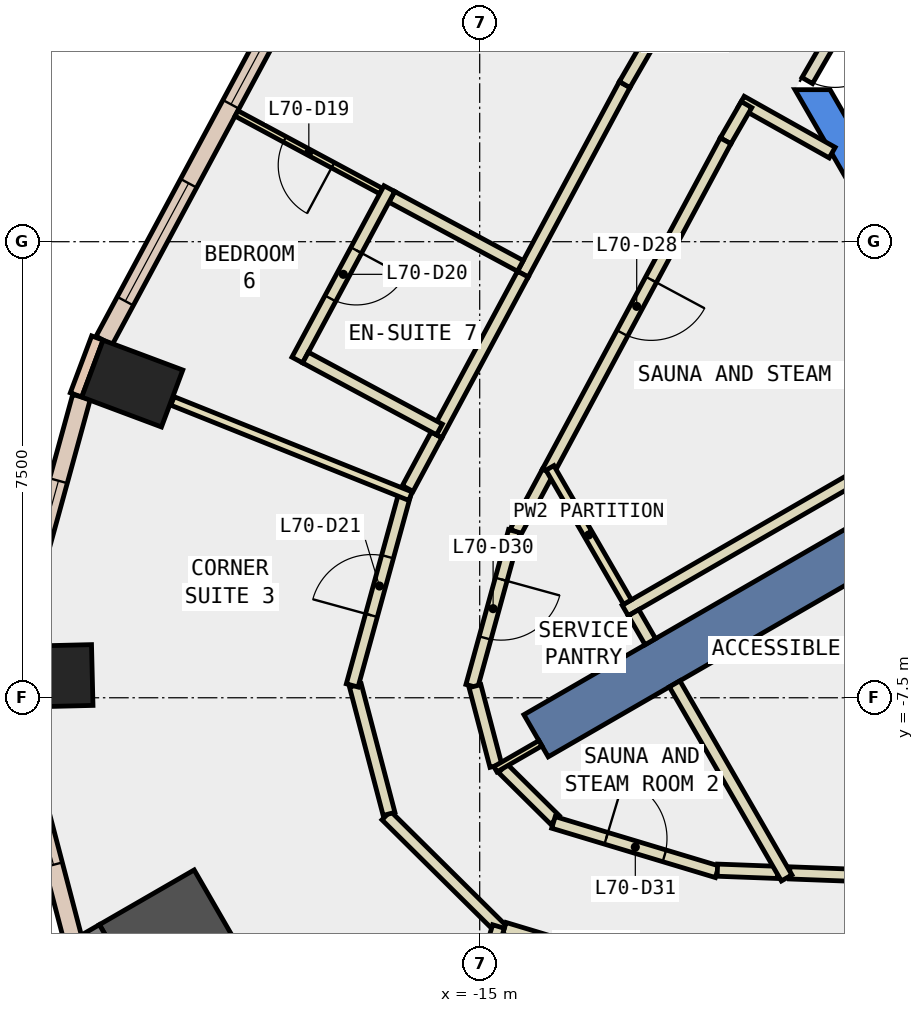
"""IFC4 building model, lengths in metres.
Left out: names, types, materials, properties, quantities, classifications, styles, units other than length and angle.
Written with IfcOpenShell. Run it as: python <this file> out.ifc"""

import sys

from ifc_helpers import new_model, si_unit, direction, frame, frame_2d, origin, origin_2d, place, context, subcontext, project, spatial, polyline, rectangle, outline, extrude, element, fill, save


model = new_model("IFC4")
c1 = context("Model", 3, precision=1e-05, world=origin(), true_north=direction((0.0, 1.0)))
c2 = subcontext(c1, "Body", "Model", "MODEL_VIEW")
j1 = project(units=[si_unit("LENGTHUNIT", "METRE"), si_unit("PLANEANGLEUNIT", "RADIAN")], contexts=[c1])
p1 = place(None, origin())
s1 = spatial("IfcSite", under=j1, at=p1, CompositionType="ELEMENT")
p2 = place(p1, origin())
s2 = spatial("IfcBuilding", under=s1, at=p2, CompositionType="ELEMENT")
p3 = place(p2, frame((0.0, 0.0, 300.8)))
s3 = spatial("IfcBuildingStorey", under=s2, at=p3, CompositionType="ELEMENT", Elevation=300.8)
for number, where, z_axis, x_axis in (
    (1, (-20.714, -2.333, -0.34), (0.0, 0.0, 1.0), (0.351, 0.936, 0.0)),
    (2, (-22.072, -7.143, -0.34), (0.0, 0.0, 1.0), (-0.024, 1.0, 0.0)),
):
    element("IfcColumn", number, at=place(p3, frame(where, z_axis=z_axis, x_axis=x_axis)), inside=s3, PredefinedType="COLUMN", context=c2, shape_type="SweptSolid", body=[
        extrude(rectangle(XDim=1.0, YDim=1.4, at=origin_2d()), origin(), (0.0, 0.0, 1.0), 3.6),
    ])
for number, where, z_axis, x_axis in (
    (3, (-20.025, -11.561, -0.34), (0.0, 0.0, 1.0), (0.866, 0.5, 0.0)),
    (4, (-21.584, -12.461, -0.34), (0.0, 0.0, 1.0), (0.866, 0.5, 0.0)),
):
    element("IfcColumn", number, at=place(p3, frame(where, z_axis=z_axis, x_axis=x_axis)), inside=s3, PredefinedType="COLUMN", context=c2, shape_type="SweptSolid", body=[
        extrude(rectangle(XDim=1.8, YDim=1.8, at=origin_2d()), origin(), (0.0, 0.0, 1.0), 3.6),
    ])
p4 = place(p3, frame((0.0, 0.0, -0.34)))
e5 = element("IfcWall", 5, at=p4, inside=s3, PredefinedType="SHEAR", context=c2, shape_type="SweptSolid", body=[
    extrude(outline(polyline([(-9.815, 2.5), (-4.907, -6.0), (-4.619, -5.5), (-9.238, 2.5), (-9.815, 2.5)])), origin(), (0.0, 0.0, 1.0), 3.6),
])
p5 = place(p3, frame((-6.279, -3.625, -0.34), z_axis=(0.0, 0.0, 1.0), x_axis=(-0.866017533419, -0.500013631625, 0.0)))
e6 = element("IfcWall", 6, at=p5, inside=s3, PredefinedType="SHEAR", context=c2, shape_type="SweptSolid", body=[
    extrude(rectangle(XDim=9.0, YDim=0.8, at=frame_2d((4.5, 0.0))), origin(), (0.0, 0.0, 1.0), 3.6),
])
p6 = place(p3, frame((-21.288, -1.584, 0.0), z_axis=(0.0, 0.0, 1.0), x_axis=(-0.350962844851, -0.936389385637, 0.0)))
e7 = element("IfcWall", 7, at=p6, inside=s3, PredefinedType="STANDARD", context=c2, shape_type="SweptSolid", body=[
    extrude(rectangle(XDim=1.0, YDim=0.2, at=frame_2d((0.5, 0.0))), origin(), (0.0, 0.0, 1.0), 3.26),
])
p7 = place(p3, frame((-17.701, 4.845, 0.0), z_axis=(0.0, 0.0, 1.0), x_axis=(-0.473225522632, -0.880941317415, 0.0)))
e8 = element("IfcWall", 8, at=p7, inside=s3, PredefinedType="STANDARD", context=c2, shape_type="SweptSolid", body=[
    extrude(rectangle(XDim=7.345, YDim=0.3, at=frame_2d((3.673, 0.0))), origin(), (0.0, 0.0, 1.0), 3.26),
])
p8 = place(p7, frame((0.736, 0.0, 0.9)))
e9 = element("IfcOpeningElement", 9, at=p8, cuts=e8, PredefinedType="OPENING", context=c2, shape_type="SweptSolid", body=[
    extrude(rectangle(XDim=2.2, YDim=2.0, at=frame_2d((1.1, 1.0))), frame((0.0, 0.16, 0.0), z_axis=(0.0, -1.0, 0.0), x_axis=(1.0, 0.0, 0.0)), (0.0, 0.0, 1.0), 0.32),
])
p9 = place(p7, frame((4.409, 0.0, 0.9)))
e10 = element("IfcOpeningElement", 10, at=p9, cuts=e8, PredefinedType="OPENING", context=c2, shape_type="SweptSolid", body=[
    extrude(rectangle(XDim=2.2, YDim=2.0, at=frame_2d((1.1, 1.0))), frame((0.0, 0.16, 0.0), z_axis=(0.0, -1.0, 0.0), x_axis=(1.0, 0.0, 0.0)), (0.0, 0.0, 1.0), 0.32),
])
p10 = place(p3, frame((-21.549, -2.553, 0.0), z_axis=(0.0, 0.0, 1.0), x_axis=(-0.264892613927, -0.964277917971, 0.0)))
e11 = element("IfcWall", 11, at=p10, inside=s3, PredefinedType="STANDARD", context=c2, shape_type="SweptSolid", body=[
    extrude(rectangle(XDim=4.258, YDim=0.3, at=frame_2d((2.129, 0.0))), origin(), (0.0, 0.0, 1.0), 3.26),
])
p11 = place(p10, frame((1.429, 0.0, 0.9)))
e12 = element("IfcOpeningElement", 12, at=p11, cuts=e11, PredefinedType="OPENING", context=c2, shape_type="SweptSolid", body=[
    extrude(rectangle(XDim=1.4, YDim=2.0, at=frame_2d((0.7, 1.0))), frame((0.0, 0.16, 0.0), z_axis=(0.0, -1.0, 0.0), x_axis=(1.0, 0.0, 0.0)), (0.0, 0.0, 1.0), 0.32),
])
p12 = place(p3, frame((-22.688, -7.657, 0.0), z_axis=(0.0, 0.0, 1.0), x_axis=(0.253402039956, -0.96736105263, 0.0)))
e13 = element("IfcWall", 13, at=p12, inside=s3, PredefinedType="STANDARD", context=c2, shape_type="SweptSolid", body=[
    extrude(rectangle(XDim=3.954, YDim=0.3, at=frame_2d((1.977, 0.0))), origin(), (0.0, 0.0, 1.0), 3.26),
])
p13 = place(p12, frame((1.277, 0.0, 0.9)))
e14 = element("IfcOpeningElement", 14, at=p13, cuts=e13, PredefinedType="OPENING", context=c2, shape_type="SweptSolid", body=[
    extrude(rectangle(XDim=1.4, YDim=2.0, at=frame_2d((0.7, 1.0))), frame((0.0, 0.16, 0.0), z_axis=(0.0, -1.0, 0.0), x_axis=(1.0, 0.0, 0.0)), (0.0, 0.0, 1.0), 0.32),
])
p14 = place(p3, frame((-9.203, 1.465, 0.0), z_axis=(0.0, 0.0, 1.0), x_axis=(-0.872243753731, 0.489071399775, 0.0)))
e15 = element("IfcWall", 15, at=p14, inside=s3, PredefinedType="PARTITIONING", context=c2, shape_type="SweptSolid", body=[
    extrude(rectangle(XDim=1.715, YDim=0.2, at=frame_2d((0.858, 0.0))), origin(), (0.0, 0.0, 1.0), 3.26),
])
p15 = place(p3, frame((-10.612, 2.255, 0.0), z_axis=(0.0, 0.0, 1.0), x_axis=(-0.499916971989, -0.866073334723, 0.0)))
e16 = element("IfcWall", 16, at=p15, inside=s3, PredefinedType="PARTITIONING", context=c2, shape_type="SweptSolid", body=[
    extrude(rectangle(XDim=0.688, YDim=0.2, at=frame_2d((0.344, 0.0))), origin(), (0.0, 0.0, 1.0), 3.26),
])
p16 = place(p3, frame((-10.956, 1.659, 0.0), z_axis=(0.0, 0.0, 1.0), x_axis=(-0.473095976848, -0.881010894762, 0.0)))
e17 = element("IfcWall", 17, at=p16, inside=s3, PredefinedType="PARTITIONING", context=c2, shape_type="SweptSolid", body=[
    extrude(rectangle(XDim=6.18, YDim=0.2, at=frame_2d((3.09, 0.0))), origin(), (0.0, 0.0, 1.0), 3.26),
])
p17 = place(p16, frame((2.59, 0.0, 0.0)))
e18 = element("IfcOpeningElement", 18, at=p17, cuts=e17, PredefinedType="OPENING", context=c2, shape_type="SweptSolid", body=[
    extrude(rectangle(XDim=1.0, YDim=2.1, at=frame_2d((0.5, 1.05))), frame((0.0, 0.11, 0.0), z_axis=(0.0, -1.0, 0.0), x_axis=(1.0, 0.0, 0.0)), (0.0, 0.0, 1.0), 0.22),
])
p18 = place(p3, frame((-9.902, -10.38, 0.0), z_axis=(0.0, 0.0, 1.0), x_axis=(0.999295503749, -0.037529937222, 0.0)))
e19 = element("IfcWall", 19, at=p18, inside=s3, PredefinedType="PARTITIONING", context=c2, shape_type="SweptSolid", body=[
    extrude(rectangle(XDim=2.004, YDim=0.2, at=frame_2d((1.002, 0.0))), origin(), (0.0, 0.0, 1.0), 3.26),
])
p19 = place(p3, frame((-13.88, -3.786, 0.0), z_axis=(0.0, 0.0, 1.0), x_axis=(-0.473500327913, -0.880793641817, 0.0)))
e20 = element("IfcWall", 20, at=p19, inside=s3, PredefinedType="PARTITIONING", context=c2, shape_type="SweptSolid", body=[
    extrude(rectangle(XDim=1.117, YDim=0.2, at=frame_2d((0.559, 0.0))), origin(), (0.0, 0.0, 1.0), 3.26),
])
p20 = place(p3, frame((-14.429, -4.761, 0.0), z_axis=(0.0, 0.0, 1.0), x_axis=(-0.265321869293, -0.964159896321, 0.0)))
e21 = element("IfcWall", 21, at=p20, inside=s3, PredefinedType="PARTITIONING", context=c2, shape_type="SweptSolid", body=[
    extrude(rectangle(XDim=2.642, YDim=0.2, at=frame_2d((1.321, 0.0))), origin(), (0.0, 0.0, 1.0), 3.26),
])
p21 = place(p20, frame((0.821, 0.0, 0.0)))
e22 = element("IfcOpeningElement", 22, at=p21, cuts=e21, PredefinedType="OPENING", context=c2, shape_type="SweptSolid", body=[
    extrude(rectangle(XDim=1.0, YDim=2.1, at=frame_2d((0.5, 1.05))), frame((0.0, 0.11, 0.0), z_axis=(0.0, -1.0, 0.0), x_axis=(1.0, 0.0, 0.0)), (0.0, 0.0, 1.0), 0.22),
])
p22 = place(p3, frame((-15.078, -7.309, 0.0), z_axis=(0.0, 0.0, 1.0), x_axis=(0.254014079025, -0.967200520914, 0.0)))
e23 = element("IfcWall", 23, at=p22, inside=s3, PredefinedType="PARTITIONING", context=c2, shape_type="SweptSolid", body=[
    extrude(rectangle(XDim=1.354, YDim=0.2, at=frame_2d((0.677, 0.0))), origin(), (0.0, 0.0, 1.0), 3.26),
])
p23 = place(p3, frame((-14.62, -8.66, 0.0), z_axis=(0.0, 0.0, 1.0), x_axis=(0.710838137113, -0.703355630407, 0.0)))
e24 = element("IfcWall", 24, at=p23, inside=s3, PredefinedType="PARTITIONING", context=c2, shape_type="SweptSolid", body=[
    extrude(rectangle(XDim=1.207, YDim=0.2, at=frame_2d((0.604, 0.0))), origin(), (0.0, 0.0, 1.0), 3.26),
])
p24 = place(p3, frame((-13.787, -9.55, 0.0), z_axis=(0.0, 0.0, 1.0), x_axis=(0.957493454064, -0.288454997225, 0.0)))
e25 = element("IfcWall", 25, at=p24, inside=s3, PredefinedType="PARTITIONING", context=c2, shape_type="SweptSolid", body=[
    extrude(rectangle(XDim=2.812, YDim=0.2, at=frame_2d((1.406, 0.0))), origin(), (0.0, 0.0, 1.0), 3.26),
])
p25 = place(p24, frame((0.906, 0.0, 0.0)))
e26 = element("IfcOpeningElement", 26, at=p25, cuts=e25, PredefinedType="OPENING", context=c2, shape_type="SweptSolid", body=[
    extrude(rectangle(XDim=1.0, YDim=2.1, at=frame_2d((0.5, 1.05))), frame((0.0, 0.11, 0.0), z_axis=(0.0, -1.0, 0.0), x_axis=(1.0, 0.0, 0.0)), (0.0, 0.0, 1.0), 0.22),
])
p26 = place(p3, frame((-11.091, -10.335, 0.0), z_axis=(0.0, 0.0, 1.0), x_axis=(0.999296807198, -0.037495214686, 0.0)))
e27 = element("IfcWall", 27, at=p26, inside=s3, PredefinedType="PARTITIONING", context=c2, shape_type="SweptSolid", body=[
    extrude(rectangle(XDim=0.99, YDim=0.2, at=frame_2d((0.495, 0.0))), origin(), (0.0, 0.0, 1.0), 3.26),
])
p27 = place(p3, frame((-14.29, -0.533, 0.0), z_axis=(0.0, 0.0, 1.0), x_axis=(0.473161350875, 0.880975786295, 0.0)))
e28 = element("IfcWall", 28, at=p27, inside=s3, PredefinedType="PARTITIONING", context=c2, shape_type="SweptSolid", body=[
    extrude(rectangle(XDim=3.538, YDim=0.2, at=frame_2d((1.769, 0.0))), origin(), (0.0, 0.0, 1.0), 3.26),
])
p28 = place(p3, frame((-12.616, 2.584, 0.0), z_axis=(0.0, 0.0, 1.0), x_axis=(0.50008212199, 0.86597798544, 0.0)))
e29 = element("IfcWall", 29, at=p28, inside=s3, PredefinedType="PARTITIONING", context=c2, shape_type="SweptSolid", body=[
    extrude(rectangle(XDim=3.995, YDim=0.2, at=frame_2d((1.998, 0.0))), origin(), (0.0, 0.0, 1.0), 3.26),
])
p29 = place(p28, frame((1.498, 0.0, 0.0)))
e30 = element("IfcOpeningElement", 30, at=p29, cuts=e29, PredefinedType="OPENING", context=c2, shape_type="SweptSolid", body=[
    extrude(rectangle(XDim=1.0, YDim=2.1, at=frame_2d((0.5, 1.05))), frame((0.0, 0.11, 0.0), z_axis=(0.0, -1.0, 0.0), x_axis=(1.0, 0.0, 0.0)), (0.0, 0.0, 1.0), 0.22),
])
p30 = place(p3, frame((-16.184, -4.059, 0.0), z_axis=(0.0, 0.0, 1.0), x_axis=(0.473039108954, 0.881041430013, 0.0)))
e31 = element("IfcWall", 31, at=p30, inside=s3, PredefinedType="PARTITIONING", context=c2, shape_type="SweptSolid", body=[
    extrude(rectangle(XDim=1.002, YDim=0.2, at=frame_2d((0.501, 0.0))), origin(), (0.0, 0.0, 1.0), 3.26),
])
p31 = place(p3, frame((-15.71, -3.176, 0.0), z_axis=(0.0, 0.0, 1.0), x_axis=(0.473255284848, 0.880925329051, 0.0)))
e32 = element("IfcWall", 32, at=p31, inside=s3, PredefinedType="PARTITIONING", context=c2, shape_type="SweptSolid", body=[
    extrude(rectangle(XDim=3.0, YDim=0.2, at=frame_2d((1.5, 0.0))), origin(), (0.0, 0.0, 1.0), 3.26),
])
p32 = place(p3, frame((-14.62, -11.333, 0.0), z_axis=(0.0, 0.0, 1.0), x_axis=(-0.710808598142, 0.703385482369, 0.0)))
e33 = element("IfcWall", 33, at=p32, inside=s3, PredefinedType="PARTITIONING", context=c2, shape_type="SweptSolid", body=[
    extrude(rectangle(XDim=2.697, YDim=0.2, at=frame_2d((1.349, 0.0))), origin(), (0.0, 0.0, 1.0), 3.26),
])
p33 = place(p3, frame((-16.491, -9.41, 0.0), z_axis=(0.0, 0.0, 1.0), x_axis=(-0.253618393349, 0.967304352598, 0.0)))
e34 = element("IfcWall", 34, at=p33, inside=s3, PredefinedType="PARTITIONING", context=c2, shape_type="SweptSolid", body=[
    extrude(rectangle(XDim=2.184, YDim=0.2, at=frame_2d((1.092, 0.0))), origin(), (0.0, 0.0, 1.0), 3.26),
])
p34 = place(p3, frame((-17.097, -7.297, 0.0), z_axis=(0.0, 0.0, 1.0), x_axis=(0.264861686213, 0.964286413456, 0.0)))
e35 = element("IfcWall", 35, at=p34, inside=s3, PredefinedType="PARTITIONING", context=c2, shape_type="SweptSolid", body=[
    extrude(rectangle(XDim=3.292, YDim=0.2, at=frame_2d((1.646, 0.0))), origin(), (0.0, 0.0, 1.0), 3.26),
])
p35 = place(p34, frame((1.195, 0.0, 0.0)))
e36 = element("IfcOpeningElement", 36, at=p35, cuts=e35, PredefinedType="OPENING", context=c2, shape_type="SweptSolid", body=[
    extrude(rectangle(XDim=1.0, YDim=2.1, at=frame_2d((0.5, 1.05))), frame((0.0, 0.11, 0.0), z_axis=(0.0, -1.0, 0.0), x_axis=(1.0, 0.0, 0.0)), (0.0, 0.0, 1.0), 0.22),
])
p36 = place(p3, frame((-12.968, -11.781, 0.0), z_axis=(0.0, 0.0, 1.0), x_axis=(-0.957517271828, 0.288375925054, 0.0)))
e37 = element("IfcWall", 37, at=p36, inside=s3, PredefinedType="PARTITIONING", context=c2, shape_type="SweptSolid", body=[
    extrude(rectangle(XDim=1.699, YDim=0.2, at=frame_2d((0.85, 0.0))), origin(), (0.0, 0.0, 1.0), 3.26),
])
p37 = place(p3, frame((-6.804, -2.714, 0.0), z_axis=(0.0, 0.0, 1.0), x_axis=(-0.866057565063, -0.499944290893, 0.0)))
e38 = element("IfcWall", 38, at=p37, inside=s3, PredefinedType="PARTITIONING", context=c2, shape_type="SweptSolid", body=[
    extrude(rectangle(XDim=6.7, YDim=0.2, at=frame_2d((3.35, 0.0))), origin(), (0.0, 0.0, 1.0), 3.26),
])
p38 = place(p3, frame((-12.57, -5.927, 0.0), z_axis=(0.0, 0.0, 1.0), x_axis=(-0.500197803108, 0.865911171983, 0.0)))
e39 = element("IfcWall", 39, at=p38, inside=s3, PredefinedType="PARTITIONING", context=c2, shape_type="SweptSolid", body=[
    extrude(rectangle(XDim=2.549, YDim=0.15, at=frame_2d((1.274, 0.0))), origin(), (0.0, 0.0, 1.0), 3.26),
])
p39 = place(p3, frame((-12.194, -6.578, 0.0), z_axis=(0.0, 0.0, 1.0), x_axis=(-0.500809139387, 0.865557742676, 0.0)))
e40 = element("IfcWall", 40, at=p39, inside=s3, PredefinedType="PARTITIONING", context=c2, shape_type="SweptSolid", body=[
    extrude(rectangle(XDim=0.551, YDim=0.2, at=frame_2d((0.275, 0.0))), origin(), (0.0, 0.0, 1.0), 3.26),
])
p40 = place(p3, frame((-9.952, -10.463, 0.0), z_axis=(0.0, 0.0, 1.0), x_axis=(-0.499837150608, 0.866119404512, 0.0)))
e41 = element("IfcWall", 41, at=p40, inside=s3, PredefinedType="PARTITIONING", context=c2, shape_type="SweptSolid", body=[
    extrude(rectangle(XDim=3.685, YDim=0.2, at=frame_2d((1.843, 0.0))), origin(), (0.0, 0.0, 1.0), 3.26),
])
p41 = place(p3, frame((-14.002, -8.248, 0.0), z_axis=(0.0, 0.0, 1.0), x_axis=(-0.866142766235, -0.499796667154, 0.0)))
e42 = element("IfcWall", 42, at=p41, inside=s3, PredefinedType="PARTITIONING", context=c2, shape_type="SweptSolid", body=[
    extrude(rectangle(XDim=0.854, YDim=0.1, at=frame_2d((0.427, 0.0))), origin(), (0.0, 0.0, 1.0), 3.26),
])
p42 = place(p3, frame((-16.621, 0.832, 0.0), z_axis=(0.0, 0.0, 1.0), x_axis=(-0.880914863524, 0.47327476504, 0.0)))
e43 = element("IfcWall", 43, at=p42, inside=s3, PredefinedType="PARTITIONING", context=c2, shape_type="SweptSolid", body=[
    extrude(rectangle(XDim=2.7, YDim=0.1, at=frame_2d((1.35, 0.0))), origin(), (0.0, 0.0, 1.0), 3.26),
])
p43 = place(p42, frame((0.9, 0.0, 0.0)))
e44 = element("IfcOpeningElement", 44, at=p43, cuts=e43, PredefinedType="OPENING", context=c2, shape_type="SweptSolid", body=[
    extrude(rectangle(XDim=0.9, YDim=2.1, at=frame_2d((0.45, 1.05))), frame((0.0, 0.06, 0.0), z_axis=(0.0, -1.0, 0.0), x_axis=(1.0, 0.0, 0.0)), (0.0, 0.0, 1.0), 0.12),
])
p44 = place(p3, frame((-14.331, -0.398, 0.0), z_axis=(0.0, 0.0, 1.0), x_axis=(-0.880875830026, 0.473347411608, 0.0)))
e45 = element("IfcWall", 45, at=p44, inside=s3, PredefinedType="PARTITIONING", context=c2, shape_type="SweptSolid", body=[
    extrude(rectangle(XDim=2.4, YDim=0.2, at=frame_2d((1.2, 0.0))), origin(), (0.0, 0.0, 1.0), 3.26),
])
p45 = place(p3, frame((-16.486, 0.873, 0.0), z_axis=(0.0, 0.0, 1.0), x_axis=(-0.473116768279, -0.88099972961, 0.0)))
e46 = element("IfcWall", 46, at=p45, inside=s3, PredefinedType="PARTITIONING", context=c2, shape_type="SweptSolid", body=[
    extrude(rectangle(XDim=3.2, YDim=0.2, at=frame_2d((1.6, 0.0))), origin(), (0.0, 0.0, 1.0), 3.26),
])
p46 = place(p45, frame((1.15, 0.0, 0.0)))
e47 = element("IfcOpeningElement", 47, at=p46, cuts=e46, PredefinedType="OPENING", context=c2, shape_type="SweptSolid", body=[
    extrude(rectangle(XDim=0.9, YDim=2.1, at=frame_2d((0.45, 1.05))), frame((0.0, 0.11, 0.0), z_axis=(0.0, -1.0, 0.0), x_axis=(1.0, 0.0, 0.0)), (0.0, 0.0, 1.0), 0.22),
])
p47 = place(p3, frame((-17.865, -1.905, 0.0), z_axis=(0.0, 0.0, 1.0), x_axis=(0.881022314299, -0.473074710493, 0.0)))
e48 = element("IfcWall", 48, at=p47, inside=s3, PredefinedType="PARTITIONING", context=c2, shape_type="SweptSolid", body=[
    extrude(rectangle(XDim=2.5, YDim=0.2, at=frame_2d((1.25, 0.0))), origin(), (0.0, 0.0, 1.0), 3.26),
])
p48 = place(p3, frame((-16.138, -4.185, 0.0), z_axis=(0.0, 0.0, 1.0), x_axis=(-0.928432751736, 0.371500505388, 0.0)))
e49 = element("IfcWall", 49, at=p48, inside=s3, PredefinedType="PARTITIONING", context=c2, shape_type="SweptSolid", body=[
    extrude(rectangle(XDim=4.216, YDim=0.15, at=frame_2d((2.108, 0.0))), origin(), (0.0, 0.0, 1.0), 3.26),
])
p49 = place(p3, frame((-14.691, -11.262, 0.0), z_axis=(0.0, 0.0, 1.0), x_axis=(-0.288440595492, -0.95749779262, 0.0)))
e50 = element("IfcWall", 50, at=p49, inside=s3, PredefinedType="PARTITIONING", context=c2, shape_type="SweptSolid", body=[
    extrude(rectangle(XDim=2.5, YDim=0.2, at=frame_2d((1.25, 0.0))), origin(), (0.0, 0.0, 1.0), 3.26),
])
p50 = place(p3, frame((-9.15, 3.452, 0.0), z_axis=(0.0, 0.0, 1.0), x_axis=(-0.500079945886, -0.865979242085, 0.0)))
e51 = element("IfcWall", 51, at=p50, inside=s3, PredefinedType="PARTITIONING", context=c2, shape_type="SweptSolid", body=[
    extrude(rectangle(XDim=0.926, YDim=0.2, at=frame_2d((0.463, 0.0))), origin(), (0.0, 0.0, 1.0), 2.4),
])
p51 = place(p50, frame((0.017, 0.0, 0.0)))
e52 = element("IfcOpeningElement", 52, at=p51, cuts=e51, PredefinedType="OPENING", context=c2, shape_type="SweptSolid", body=[
    extrude(rectangle(XDim=0.9, YDim=2.1, at=frame_2d((0.45, 1.05))), frame((0.0, 0.11, 0.0), z_axis=(0.0, -1.0, 0.0), x_axis=(1.0, 0.0, 0.0)), (0.0, 0.0, 1.0), 0.22),
])
p52 = place(p8, origin())
e53 = element("IfcWindow", 53, at=p52, inside=s3, PartitioningType="SINGLE_PANEL", PredefinedType="WINDOW", context=c2, shape_type="SweptSolid", body=[
    extrude(rectangle(XDim=2.2, YDim=2.0, at=frame_2d((1.1, 1.0))), frame((0.0, 0.03, 0.0), z_axis=(0.0, -1.0, 0.0), x_axis=(1.0, 0.0, 0.0)), (0.0, 0.0, 1.0), 0.06),
])
fill(e9, e53)
p53 = place(p9, origin())
e54 = element("IfcWindow", 54, at=p53, inside=s3, PartitioningType="SINGLE_PANEL", PredefinedType="WINDOW", context=c2, shape_type="SweptSolid", body=[
    extrude(rectangle(XDim=2.2, YDim=2.0, at=frame_2d((1.1, 1.0))), frame((0.0, 0.03, 0.0), z_axis=(0.0, -1.0, 0.0), x_axis=(1.0, 0.0, 0.0)), (0.0, 0.0, 1.0), 0.06),
])
fill(e10, e54)
p54 = place(p11, origin())
e55 = element("IfcWindow", 55, at=p54, inside=s3, PartitioningType="SINGLE_PANEL", PredefinedType="WINDOW", context=c2, shape_type="SweptSolid", body=[
    extrude(rectangle(XDim=1.4, YDim=2.0, at=frame_2d((0.7, 1.0))), frame((0.0, 0.03, 0.0), z_axis=(0.0, -1.0, 0.0), x_axis=(1.0, 0.0, 0.0)), (0.0, 0.0, 1.0), 0.06),
])
fill(e12, e55)
p55 = place(p13, origin())
e56 = element("IfcWindow", 56, at=p55, inside=s3, PartitioningType="SINGLE_PANEL", PredefinedType="WINDOW", context=c2, shape_type="SweptSolid", body=[
    extrude(rectangle(XDim=1.4, YDim=2.0, at=frame_2d((0.7, 1.0))), frame((0.0, 0.03, 0.0), z_axis=(0.0, -1.0, 0.0), x_axis=(1.0, 0.0, 0.0)), (0.0, 0.0, 1.0), 0.06),
])
fill(e14, e56)
p56 = place(p43, origin())
e57 = element("IfcDoor", 57, at=p56, inside=s3, OperationType="SINGLE_SWING_LEFT", PredefinedType="DOOR", context=c2, shape_type="SweptSolid", body=[
    extrude(rectangle(XDim=0.9, YDim=2.1, at=frame_2d((0.45, 1.05))), frame((0.0, 0.025, 0.0), z_axis=(0.0, -1.0, 0.0), x_axis=(1.0, 0.0, 0.0)), (0.0, 0.0, 1.0), 0.05),
])
fill(e44, e57)
p57 = place(p46, origin())
e58 = element("IfcDoor", 58, at=p57, inside=s3, OperationType="SINGLE_SWING_LEFT", PredefinedType="DOOR", context=c2, shape_type="SweptSolid", body=[
    extrude(rectangle(XDim=0.9, YDim=2.1, at=frame_2d((0.45, 1.05))), frame((0.0, 0.025, 0.0), z_axis=(0.0, -1.0, 0.0), x_axis=(1.0, 0.0, 0.0)), (0.0, 0.0, 1.0), 0.05),
])
fill(e47, e58)
p58 = place(p35, origin())
e59 = element("IfcDoor", 59, at=p58, inside=s3, OperationType="SINGLE_SWING_RIGHT", PredefinedType="DOOR", context=c2, shape_type="SweptSolid", body=[
    extrude(rectangle(XDim=1.0, YDim=2.1, at=frame_2d((0.5, 1.05))), frame((0.0, 0.025, 0.0), z_axis=(0.0, -1.0, 0.0), x_axis=(1.0, 0.0, 0.0)), (0.0, 0.0, 1.0), 0.05),
])
fill(e36, e59)
p59 = place(p17, origin())
e60 = element("IfcDoor", 60, at=p59, inside=s3, OperationType="SINGLE_SWING_LEFT", PredefinedType="DOOR", context=c2, shape_type="SweptSolid", body=[
    extrude(rectangle(XDim=1.0, YDim=2.1, at=frame_2d((0.5, 1.05))), frame((0.0, 0.025, 0.0), z_axis=(0.0, -1.0, 0.0), x_axis=(1.0, 0.0, 0.0)), (0.0, 0.0, 1.0), 0.05),
])
fill(e18, e60)
p60 = place(p21, origin())
e61 = element("IfcDoor", 61, at=p60, inside=s3, OperationType="SINGLE_SWING_LEFT", PredefinedType="DOOR", context=c2, shape_type="SweptSolid", body=[
    extrude(rectangle(XDim=1.0, YDim=2.1, at=frame_2d((0.5, 1.05))), frame((0.0, 0.025, 0.0), z_axis=(0.0, -1.0, 0.0), x_axis=(1.0, 0.0, 0.0)), (0.0, 0.0, 1.0), 0.05),
])
fill(e22, e61)
p61 = place(p25, origin())
e62 = element("IfcDoor", 62, at=p61, inside=s3, OperationType="SINGLE_SWING_LEFT", PredefinedType="DOOR", context=c2, shape_type="SweptSolid", body=[
    extrude(rectangle(XDim=1.0, YDim=2.1, at=frame_2d((0.5, 1.05))), frame((0.0, 0.025, 0.0), z_axis=(0.0, -1.0, 0.0), x_axis=(1.0, 0.0, 0.0)), (0.0, 0.0, 1.0), 0.05),
])
fill(e26, e62)
p62 = place(p51, origin())
e63 = element("IfcDoor", 63, at=p62, inside=s3, OperationType="SINGLE_SWING_LEFT", PredefinedType="DOOR", context=c2, shape_type="SweptSolid", body=[
    extrude(rectangle(XDim=0.9, YDim=2.1, at=frame_2d((0.45, 1.05))), frame((0.0, 0.025, 0.0), z_axis=(0.0, -1.0, 0.0), x_axis=(1.0, 0.0, 0.0)), (0.0, 0.0, 1.0), 0.05),
])
fill(e52, e63)
save(model, sys.argv[1])
